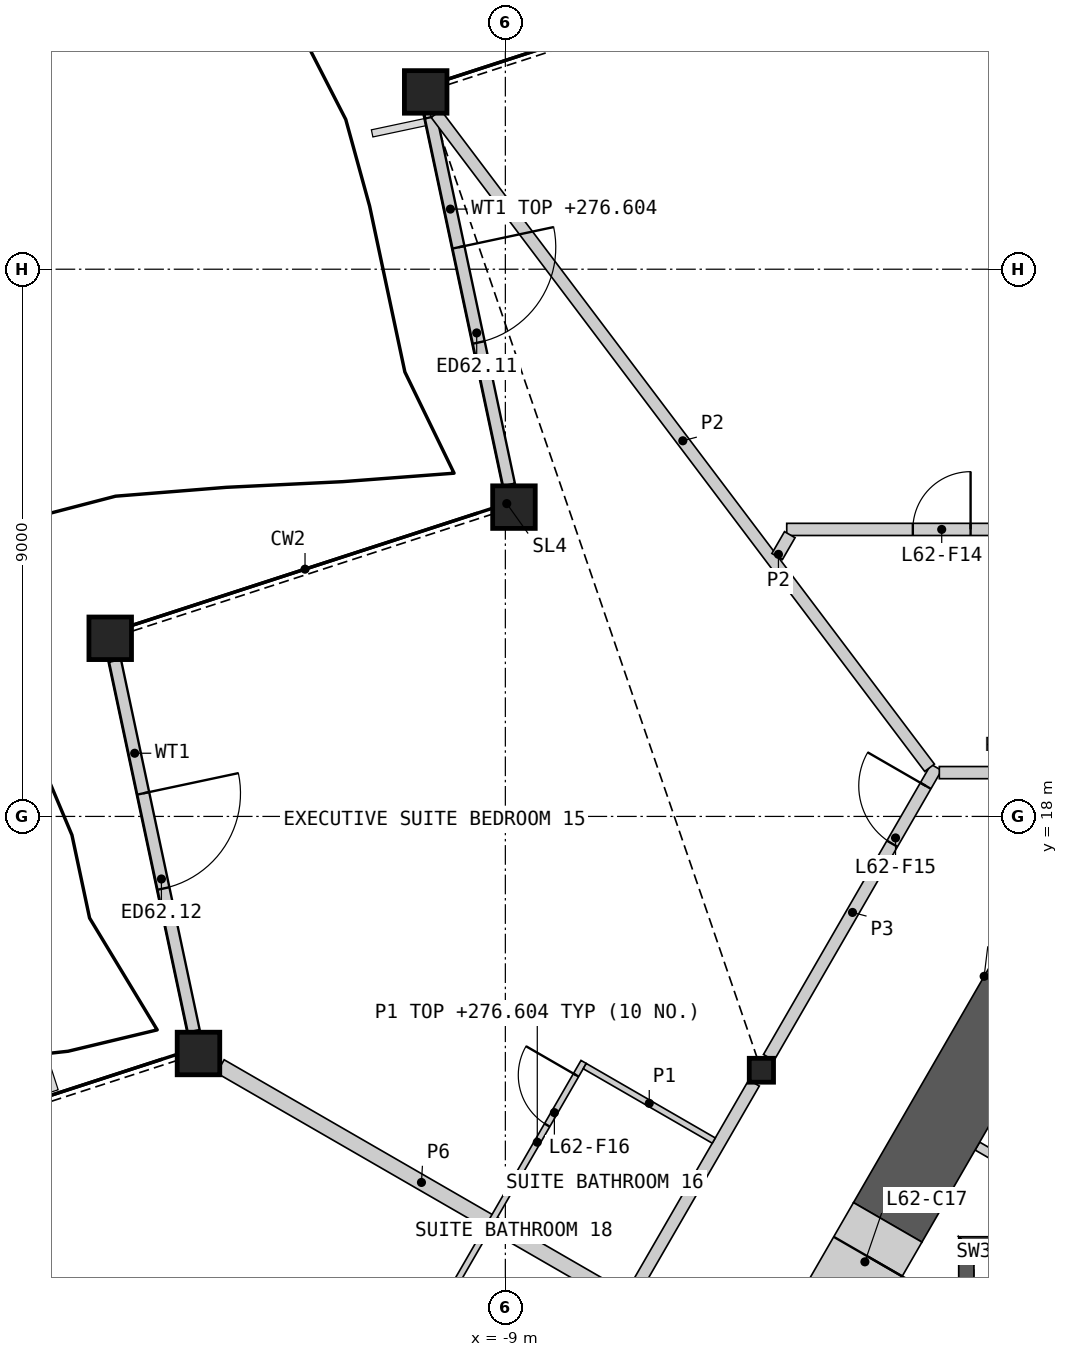
"""IFC4 building model, lengths in metres.
Left out: names, types, materials, properties, quantities, classifications, styles, units other than length and angle.
Written with IfcOpenShell. Run it as: python <this file> out.ifc"""

import sys

from ifc_helpers import new_model, si_unit, direction, frame, frame_2d, origin, origin_2d, place, context, subcontext, project, spatial, polyline, rectangle, hollow_rectangle, i_section, outline, extrude, element, fill, save


model = new_model("IFC4")
c1 = context("Model", 3, precision=1e-05, world=origin(), true_north=direction((0.0, 1.0)))
c2 = subcontext(c1, "Body", "Model", "MODEL_VIEW")
j1 = project(units=[si_unit("LENGTHUNIT", "METRE"), si_unit("PLANEANGLEUNIT", "RADIAN")], contexts=[c1])
p1 = place(None, origin())
s1 = spatial("IfcSite", under=j1, at=p1, CompositionType="ELEMENT")
p2 = place(p1, origin())
s2 = spatial("IfcBuilding", under=s1, at=p2, CompositionType="ELEMENT")
p3 = place(p2, frame((0.0, 0.0, 274.2)))
s3 = spatial("IfcBuildingStorey", under=s2, at=p3, CompositionType="ELEMENT", Elevation=274.2)
for number, where, z_axis, x_axis in (
    (1, (-10.31, 29.916, 0.0), (0.0, 0.0, 1.0), (1.0, 0.0, 0.0)),
    (2, (-8.859, 23.087, 0.0), (0.0, 0.0, 1.0), (1.0, 0.0, 0.0)),
    (3, (-15.499, 20.93, 0.0), (0.0, 0.0, 1.0), (1.0, 0.0, 0.0)),
    (4, (-14.047, 14.101, 0.0), (0.0, 0.0, 1.0), (1.0, 0.0, 0.0)),
):
    element("IfcColumn", number, at=place(p3, frame(where, z_axis=z_axis, x_axis=x_axis)), inside=s3, PredefinedType="COLUMN", context=c2, shape_type="SweptSolid", body=[
        extrude(hollow_rectangle(XDim=0.7, YDim=0.7, WallThickness=0.045, at=origin_2d()), origin(), (0.0, 0.0, 1.0), 3.6),
    ])
p4 = place(p3, frame((-4.789, 13.825, 0.0), z_axis=(0.0, 0.0, 1.0), x_axis=(1.0, 0.0, 0.0)))
e5 = element("IfcColumn", 5, at=p4, inside=s3, PredefinedType="COLUMN", context=c2, shape_type="SweptSolid", body=[
    extrude(i_section(OverallWidth=0.399, OverallDepth=0.393, WebThickness=0.023, FlangeThickness=0.037, at=origin_2d()), origin(), (0.0, 0.0, 1.0), 3.6),
])
p5 = place(p3, frame((-10.225, 29.5, 0.0), z_axis=(0.0, 0.0, 1.0), x_axis=(0.207897015768, -0.978150719897, 0.0)))
e6 = element("IfcWall", 6, at=p5, inside=s3, PredefinedType="SOLIDWALL", context=c2, shape_type="SweptSolid", body=[
    extrude(rectangle(XDim=6.182, YDim=0.2, at=frame_2d((3.091, 0.0))), origin(), (0.0, 0.0, 1.0), 2.404),
])
p6 = place(p5, frame((2.188, 0.0, 0.0)))
e7 = element("IfcOpeningElement", 7, at=p6, cuts=e6, PredefinedType="OPENING", context=c2, shape_type="SweptSolid", body=[
    extrude(rectangle(XDim=1.6, YDim=2.4, at=frame_2d((0.8, 1.2))), frame((0.0, 0.11, 0.0), z_axis=(0.0, -1.0, 0.0), x_axis=(1.0, 0.0, 0.0)), (0.0, 0.0, 1.0), 0.22),
])
p7 = place(p3, frame((-15.42, 20.563, 0.0), z_axis=(0.0, 0.0, 1.0), x_axis=(0.207907484076, -0.978148494895, 0.0)))
e8 = element("IfcWall", 8, at=p7, inside=s3, PredefinedType="SOLIDWALL", context=c2, shape_type="SweptSolid", body=[
    extrude(rectangle(XDim=6.232, YDim=0.2, at=frame_2d((3.116, 0.0))), origin(), (0.0, 0.0, 1.0), 2.701),
])
p8 = place(p7, frame((2.232, 0.0, 0.0)))
e9 = element("IfcOpeningElement", 9, at=p8, cuts=e8, PredefinedType="OPENING", context=c2, shape_type="SweptSolid", body=[
    extrude(rectangle(XDim=1.6, YDim=2.4, at=frame_2d((0.8, 1.2))), frame((0.0, 0.11, 0.0), z_axis=(0.0, -1.0, 0.0), x_axis=(1.0, 0.0, 0.0)), (0.0, 0.0, 1.0), 0.22),
])
p9 = place(p3, origin())
e10 = element("IfcWall", 10, at=p9, inside=s3, PredefinedType="SHEAR", context=c2, shape_type="SweptSolid", body=[
    extrude(outline(polyline([(1.544, 11.087), (-1.544, 11.087), (-1.294, 10.837), (1.294, 10.837), (1.544, 11.087)])), origin(), (0.0, 0.0, 1.0), 3.25),
])
p10 = place(p3, origin())
e11 = element("IfcWall", 11, at=p10, inside=s3, PredefinedType="SHEAR", context=c2, shape_type="SweptSolid", body=[
    extrude(outline(polyline([(-1.294, 10.837), (-1.544, 11.087), (-1.544, 5.237), (-1.294, 5.237), (-1.294, 10.837)])), origin(), (0.0, 0.0, 1.0), 3.25),
])
p11 = place(p3, frame((-1.237, 12.578, 0.0), z_axis=(0.0, 0.0, 1.0), x_axis=(0.866045649925, -0.499964931016, 0.0)))
e12 = element("IfcWall", 12, at=p11, inside=s3, PredefinedType="PARTITIONING", context=c2, shape_type="SweptSolid", body=[
    extrude(rectangle(XDim=2.992, YDim=0.15, at=frame_2d((1.496, 0.0))), origin(), (0.0, 0.0, 1.0), 3.25),
])
p12 = place(p3, frame((-0.563, 15.045, 0.0), z_axis=(0.0, 0.0, 1.0), x_axis=(-0.499994567278, -0.866028540345, 0.0)))
e13 = element("IfcWall", 13, at=p12, inside=s3, PredefinedType="SHEAR", context=c2, shape_type="SweptSolid", body=[
    extrude(rectangle(XDim=4.297, YDim=1.3, at=frame_2d((2.149, 0.0))), origin(), (0.0, 0.0, 1.0), 3.25),
])
p13 = place(p3, origin())
e14 = element("IfcWall", 14, at=p13, inside=s3, PredefinedType="SHEAR", context=c2, shape_type="SweptSolid", body=[
    extrude(outline(polyline([(-1.126, 15.371), (0.0, 17.321), (1.126, 15.371), (0.0, 14.72), (-1.126, 15.371)])), origin(), (0.0, 0.0, 1.0), 3.25),
])
p14 = place(p3, frame((-2.712, 11.324, 0.0), z_axis=(0.0, 0.0, 1.0), x_axis=(-0.499946605688, -0.86605622881, 0.0)))
e15 = element("IfcWall", 15, at=p14, inside=s3, PredefinedType="SHEAR", context=c2, shape_type="SweptSolid", body=[
    extrude(rectangle(XDim=2.2, YDim=1.3, at=frame_2d((1.1, 0.0))), origin(), (0.0, 0.0, 1.0), 3.25),
])
p15 = place(p14, frame((0.65, 0.0, 0.0)))
e16 = element("IfcOpeningElement", 16, at=p15, cuts=e15, PredefinedType="OPENING", context=c2, shape_type="SweptSolid", body=[
    extrude(rectangle(XDim=1.0, YDim=2.1, at=frame_2d((0.5, 1.05))), frame((0.0, 0.66, 0.0), z_axis=(0.0, -1.0, 0.0), x_axis=(1.0, 0.0, 0.0)), (0.0, 0.0, 1.0), 1.32),
])
p16 = place(p3, frame((-9.458, 5.74, 0.0), z_axis=(0.0, 0.0, 1.0), x_axis=(0.50000207303, 0.866024206917, 0.0)))
e17 = element("IfcWall", 17, at=p16, inside=s3, PredefinedType="PARTITIONING", context=c2, shape_type="SweptSolid", body=[
    extrude(rectangle(XDim=9.095, YDim=0.2, at=frame_2d((4.547, 0.0))), origin(), (0.0, 0.0, 1.0), 3.25),
])
p17 = place(p3, frame((-13.687, 13.889, 0.0), z_axis=(0.0, 0.0, 1.0), x_axis=(0.866041332704, -0.499972409287, 0.0)))
e18 = element("IfcWall", 18, at=p17, inside=s3, PredefinedType="PARTITIONING", context=c2, shape_type="SweptSolid", body=[
    extrude(rectangle(XDim=7.638, YDim=0.25, at=frame_2d((3.819, 0.0))), origin(), (0.0, 0.0, 1.0), 2.404),
])
p18 = place(p3, frame((-4.668, 14.035, 0.0), z_axis=(0.0, 0.0, 1.0), x_axis=(0.499984524817, 0.866034338201, 0.0)))
e19 = element("IfcWall", 19, at=p18, inside=s3, PredefinedType="PARTITIONING", context=c2, shape_type="SweptSolid", body=[
    extrude(rectangle(XDim=5.51, YDim=0.2, at=frame_2d((2.755, 0.0))), origin(), (0.0, 0.0, 1.0), 3.25),
])
p19 = place(p18, frame((4.06, 0.0, 0.0)))
e20 = element("IfcOpeningElement", 20, at=p19, cuts=e19, PredefinedType="OPENING", context=c2, shape_type="SweptSolid", body=[
    extrude(rectangle(XDim=1.1, YDim=2.1, at=frame_2d((0.55, 1.05))), frame((0.0, 0.11, 0.0), z_axis=(0.0, -1.0, 0.0), x_axis=(1.0, 0.0, 0.0)), (0.0, 0.0, 1.0), 0.22),
])
p20 = place(p3, frame((-1.863, 18.72, 0.0), z_axis=(0.0, 0.0, 1.0), x_axis=(1.0, 0.0, 0.0)))
e21 = element("IfcWall", 21, at=p20, inside=s3, PredefinedType="PARTITIONING", context=c2, shape_type="SweptSolid", body=[
    extrude(rectangle(XDim=3.726, YDim=0.2, at=frame_2d((1.863, 0.0))), origin(), (0.0, 0.0, 1.0), 3.25),
])
p21 = place(p20, frame((1.388, 0.0, 0.0)))
e22 = element("IfcOpeningElement", 22, at=p21, cuts=e21, PredefinedType="OPENING", context=c2, shape_type="SweptSolid", body=[
    extrude(rectangle(XDim=0.95, YDim=2.1, at=frame_2d((0.475, 1.05))), frame((0.0, 0.11, 0.0), z_axis=(0.0, -1.0, 0.0), x_axis=(1.0, 0.0, 0.0)), (0.0, 0.0, 1.0), 0.22),
])
p22 = place(p3, frame((-10.14, 29.556, 0.0), z_axis=(0.0, 0.0, 1.0), x_axis=(0.602360077041, -0.798224490721, 0.0)))
e23 = element("IfcWall", 23, at=p22, inside=s3, PredefinedType="PARTITIONING", context=c2, shape_type="SweptSolid", body=[
    extrude(rectangle(XDim=13.474, YDim=0.2, at=frame_2d((6.737, 0.0))), origin(), (0.0, 0.0, 1.0), 2.404),
])
p23 = place(p3, frame((-4.372, 22.72, 0.0), z_axis=(0.0, 0.0, 1.0), x_axis=(1.0, 0.0, 0.0)))
e24 = element("IfcWall", 24, at=p23, inside=s3, PredefinedType="PARTITIONING", context=c2, shape_type="SweptSolid", body=[
    extrude(rectangle(XDim=8.745, YDim=0.2, at=frame_2d((4.372, 0.0))), origin(), (0.0, 0.0, 1.0), 2.404),
])
p24 = place(p23, frame((2.074, 0.0, 0.0)))
e25 = element("IfcOpeningElement", 25, at=p24, cuts=e24, PredefinedType="OPENING", context=c2, shape_type="SweptSolid", body=[
    extrude(rectangle(XDim=0.95, YDim=2.1, at=frame_2d((0.475, 1.05))), frame((0.0, 0.11, 0.0), z_axis=(0.0, -1.0, 0.0), x_axis=(1.0, 0.0, 0.0)), (0.0, 0.0, 1.0), 0.22),
])
p25 = place(p3, frame((-4.53, 22.275, 0.0), z_axis=(0.0, 0.0, 1.0), x_axis=(0.499875358948, 0.866097353371, 0.0)))
e26 = element("IfcWall", 26, at=p25, inside=s3, PredefinedType="PARTITIONING", context=c2, shape_type="SweptSolid", body=[
    extrude(rectangle(XDim=0.415, YDim=0.2, at=frame_2d((0.207, 0.0))), origin(), (0.0, 0.0, 1.0), 2.404),
])
p26 = place(p3, frame((-10.762, 8.679, 0.0), z_axis=(0.0, 0.0, 1.0), x_axis=(0.500008851346, 0.866020293397, 0.0)))
e27 = element("IfcWall", 27, at=p26, inside=s3, PredefinedType="PARTITIONING", context=c2, shape_type="SweptSolid", body=[
    extrude(rectangle(XDim=6.1, YDim=0.1, at=frame_2d((3.05, 0.0))), origin(), (0.0, 0.0, 1.0), 2.404),
])
p27 = place(p26, frame((4.9, 0.0, 0.0)))
e28 = element("IfcOpeningElement", 28, at=p27, cuts=e27, PredefinedType="OPENING", context=c2, shape_type="SweptSolid", body=[
    extrude(rectangle(XDim=0.95, YDim=2.1, at=frame_2d((0.475, 1.05))), frame((0.0, 0.06, 0.0), z_axis=(0.0, -1.0, 0.0), x_axis=(1.0, 0.0, 0.0)), (0.0, 0.0, 1.0), 0.12),
])
p28 = place(p26, frame((0.25, 0.0, 0.0)))
e29 = element("IfcOpeningElement", 29, at=p28, cuts=e27, PredefinedType="OPENING", context=c2, shape_type="SweptSolid", body=[
    extrude(rectangle(XDim=0.95, YDim=2.1, at=frame_2d((0.475, 1.05))), frame((0.0, 0.06, 0.0), z_axis=(0.0, -1.0, 0.0), x_axis=(1.0, 0.0, 0.0)), (0.0, 0.0, 1.0), 0.12),
])
p29 = place(p3, frame((-7.694, 13.894, 0.0), z_axis=(0.0, 0.0, 1.0), x_axis=(0.865989751695, -0.500061746146, 0.0)))
e30 = element("IfcWall", 30, at=p29, inside=s3, PredefinedType="PARTITIONING", context=c2, shape_type="SweptSolid", body=[
    extrude(rectangle(XDim=2.45, YDim=0.1, at=frame_2d((1.225, 0.0))), origin(), (0.0, 0.0, 1.0), 2.404),
])
p30 = place(p6, origin())
e31 = element("IfcDoor", 31, at=p30, inside=s3, OperationType="DOUBLE_DOOR_SINGLE_SWING", PredefinedType="DOOR", context=c2, shape_type="SweptSolid", body=[
    extrude(rectangle(XDim=1.6, YDim=2.4, at=frame_2d((0.8, 1.2))), frame((0.0, 0.025, 0.0), z_axis=(0.0, -1.0, 0.0), x_axis=(1.0, 0.0, 0.0)), (0.0, 0.0, 1.0), 0.05),
])
fill(e7, e31)
p31 = place(p8, origin())
e32 = element("IfcDoor", 32, at=p31, inside=s3, OperationType="DOUBLE_DOOR_SINGLE_SWING", PredefinedType="DOOR", context=c2, shape_type="SweptSolid", body=[
    extrude(rectangle(XDim=1.6, YDim=2.4, at=frame_2d((0.8, 1.2))), frame((0.0, 0.025, 0.0), z_axis=(0.0, -1.0, 0.0), x_axis=(1.0, 0.0, 0.0)), (0.0, 0.0, 1.0), 0.05),
])
fill(e9, e32)
p32 = place(p15, origin())
e33 = element("IfcDoor", 33, at=p32, inside=s3, OperationType="SINGLE_SWING_LEFT", PredefinedType="DOOR", context=c2, shape_type="SweptSolid", body=[
    extrude(rectangle(XDim=1.0, YDim=2.1, at=frame_2d((0.5, 1.05))), frame((0.0, 0.405, 0.0), z_axis=(0.0, -1.0, 0.0), x_axis=(1.0, 0.0, 0.0)), (0.0, 0.0, 1.0), 0.05),
])
fill(e16, e33)
p33 = place(p24, origin())
e34 = element("IfcDoor", 34, at=p33, inside=s3, OperationType="SINGLE_SWING_RIGHT", PredefinedType="DOOR", context=c2, shape_type="SweptSolid", body=[
    extrude(rectangle(XDim=0.95, YDim=2.1, at=frame_2d((0.475, 1.05))), frame((0.0, 0.025, 0.0), z_axis=(0.0, -1.0, 0.0), x_axis=(1.0, 0.0, 0.0)), (0.0, 0.0, 1.0), 0.05),
])
fill(e25, e34)
p34 = place(p19, origin())
e35 = element("IfcDoor", 35, at=p34, inside=s3, OperationType="SINGLE_SWING_RIGHT", PredefinedType="DOOR", context=c2, shape_type="SweptSolid", body=[
    extrude(rectangle(XDim=1.1, YDim=2.1, at=frame_2d((0.55, 1.05))), frame((0.0, 0.025, 0.0), z_axis=(0.0, -1.0, 0.0), x_axis=(1.0, 0.0, 0.0)), (0.0, 0.0, 1.0), 0.05),
])
fill(e20, e35)
p35 = place(p27, origin())
e36 = element("IfcDoor", 36, at=p35, inside=s3, OperationType="SINGLE_SWING_RIGHT", PredefinedType="DOOR", context=c2, shape_type="SweptSolid", body=[
    extrude(rectangle(XDim=0.95, YDim=2.1, at=frame_2d((0.475, 1.05))), frame((0.0, 0.025, 0.0), z_axis=(0.0, -1.0, 0.0), x_axis=(1.0, 0.0, 0.0)), (0.0, 0.0, 1.0), 0.05),
])
fill(e28, e36)
save(model, sys.argv[1])
